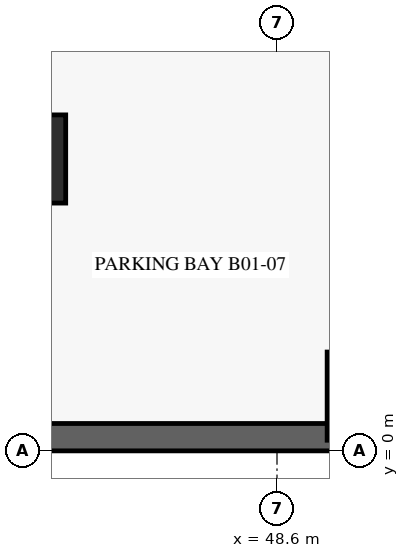
"""IFC4 building model, lengths in metres.
Left out: names, types, materials, properties, quantities, classifications, styles, units other than length and angle.
Written with IfcOpenShell. Run it as: python <this file> out.ifc"""

import sys

from ifc_helpers import new_model, si_unit, direction, frame, frame_2d, origin, origin_2d, place, context, subcontext, project, spatial, rectangle, extrude, source, transform, mapped, element, save


model = new_model("IFC4")
c1 = context("Model", 3, precision=1e-05, world=origin(), true_north=direction((0.0, 1.0)))
c2 = subcontext(c1, "Body", "Model", "MODEL_VIEW")
j1 = project(units=[si_unit("LENGTHUNIT", "METRE"), si_unit("PLANEANGLEUNIT", "RADIAN")], contexts=[c1])
p1 = place(None, origin())
s1 = spatial("IfcSite", under=j1, at=p1, CompositionType="ELEMENT")
p2 = place(p1, origin())
s2 = spatial("IfcBuilding", under=s1, at=p2, CompositionType="ELEMENT")
p3 = place(p2, frame((0.0, 0.0, -3.6)))
s3 = spatial("IfcBuildingStorey", under=s2, at=p3, CompositionType="ELEMENT", Elevation=-3.6)
p4 = place(p3, frame((0.225, 0.225, -0.36), z_axis=(0.0, 0.0, 1.0), x_axis=(1.0, 0.0, 0.0)))
e1 = element("IfcWall", 1, at=p4, inside=s3, PredefinedType="USERDEFINED", context=c2, shape_type="SweptSolid", body=[
    extrude(rectangle(XDim=64.35, YDim=0.45, at=frame_2d((32.175, 0.0))), origin(), (0.0, 0.0, 1.0), 3.578),
])
m1 = source(origin(), c2, "Body", "SweptSolid", [
    extrude(rectangle(XDim=1.45, YDim=1.45, at=origin_2d()), origin(), (0.0, 0.0, 1.0), 3.58),
])
for number, where, z_axis, x_axis in (
    (2, (44.4, 4.8, -0.36), (0.0, 0.0, 1.0), (1.0, 0.0, 0.0)),
    (3, (50.15, 0.9, -0.36), (0.0, 0.0, 1.0), (1.0, 0.0, 0.0)),
):
    element("IfcColumn", number, at=place(p3, frame(where, z_axis=z_axis, x_axis=x_axis)), inside=s3, PredefinedType="COLUMN", context=c2, shape_type="MappedRepresentation", body=[
        mapped(m1, transform((0.0, 0.0, 0.0), scale=1.0)),
    ])
save(model, sys.argv[1])
